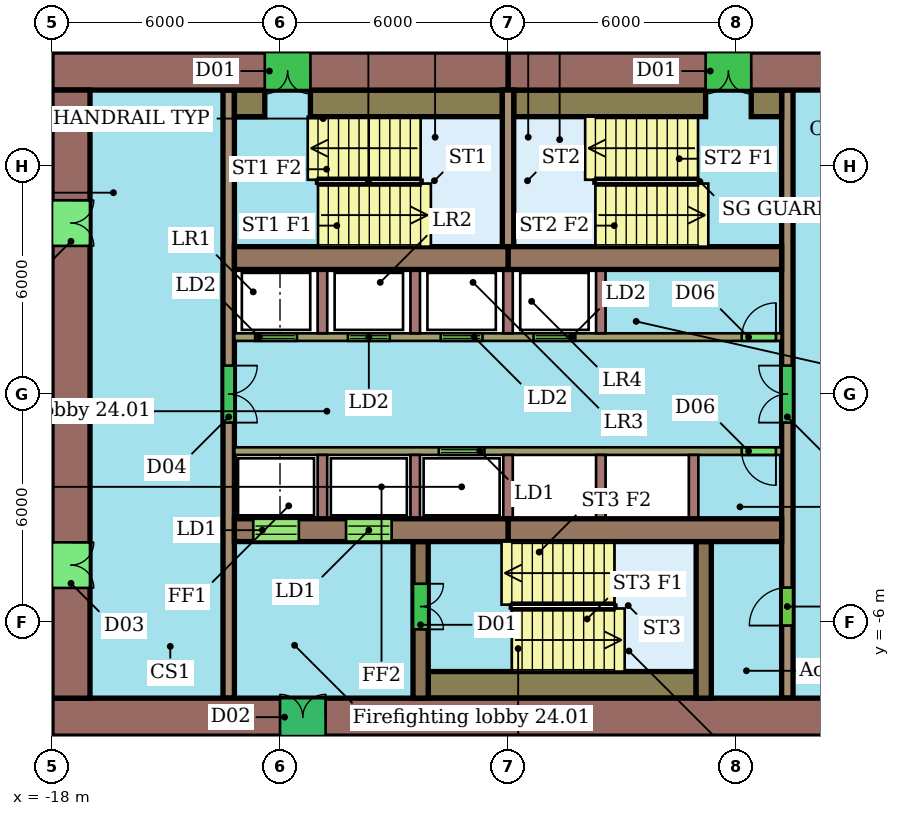
"""IFC4 building model, lengths in metres.
Left out: names, types, materials, properties, quantities, classifications, styles, units other than length and angle.
Written with IfcOpenShell. Run it as: python <this file> out.ifc"""

import sys

from ifc_helpers import new_model, si_unit, direction, frame, frame_2d, origin, place, context, subcontext, project, spatial, rectangle, extrude, element, fill, save


model = new_model("IFC4")
c1 = context("Model", 3, precision=1e-05, world=origin(), true_north=direction((0.0, 1.0)))
c2 = subcontext(c1, "Body", "Model", "MODEL_VIEW")
j1 = project(units=[si_unit("LENGTHUNIT", "METRE"), si_unit("PLANEANGLEUNIT", "RADIAN")], contexts=[c1])
p1 = place(None, origin())
s1 = spatial("IfcSite", under=j1, at=p1, CompositionType="ELEMENT")
p2 = place(p1, origin())
s2 = spatial("IfcBuilding", under=s1, at=p2, CompositionType="ELEMENT")
p3 = place(p2, frame((0.0, 0.0, 106.6)))
s3 = spatial("IfcBuildingStorey", under=s2, at=p3, CompositionType="ELEMENT", Elevation=106.6)
p4 = place(p3, frame((6.0, 8.5, 0.0), z_axis=(0.0, 0.0, 1.0), x_axis=(-1.0, 0.0, 0.0)))
e1 = element("IfcWall", 1, at=p4, inside=s3, PredefinedType="SHEAR", context=c2, shape_type="SweptSolid", body=[
    extrude(rectangle(XDim=12.0, YDim=1.0, at=frame_2d((6.0, 0.0))), origin(), (0.0, 0.0, 1.0), 3.3),
])
p5 = place(p4, frame((5.6, 0.0, 0.0)))
e2 = element("IfcOpeningElement", 2, at=p5, cuts=e1, PredefinedType="OPENING", context=c2, shape_type="SweptSolid", body=[
    extrude(rectangle(XDim=1.2, YDim=2.1, at=frame_2d((0.6, 1.05))), frame((0.0, 0.51, 0.0), z_axis=(0.0, -1.0, 0.0), x_axis=(1.0, 0.0, 0.0)), (0.0, 0.0, 1.0), 1.02),
])
p6 = place(p3, frame((-6.0, 8.5, 0.0), z_axis=(0.0, 0.0, 1.0), x_axis=(-1.0, 0.0, 0.0)))
e3 = element("IfcWall", 3, at=p6, inside=s3, PredefinedType="SHEAR", context=c2, shape_type="SweptSolid", body=[
    extrude(rectangle(XDim=12.0, YDim=1.0, at=frame_2d((6.0, 0.0))), origin(), (0.0, 0.0, 1.0), 3.3),
])
p7 = place(p6, frame((5.2, 0.0, 0.0)))
e4 = element("IfcOpeningElement", 4, at=p7, cuts=e3, PredefinedType="OPENING", context=c2, shape_type="SweptSolid", body=[
    extrude(rectangle(XDim=1.2, YDim=2.1, at=frame_2d((0.6, 1.05))), frame((0.0, 0.51, 0.0), z_axis=(0.0, -1.0, 0.0), x_axis=(1.0, 0.0, 0.0)), (0.0, 0.0, 1.0), 1.02),
])
p8 = place(p3, frame((-18.0, -8.5, 0.0), z_axis=(0.0, 0.0, 1.0), x_axis=(1.0, 0.0, 0.0)))
e5 = element("IfcWall", 5, at=p8, inside=s3, PredefinedType="SHEAR", context=c2, shape_type="SweptSolid", body=[
    extrude(rectangle(XDim=24.0, YDim=1.0, at=frame_2d((12.0, 0.0))), origin(), (0.0, 0.0, 1.0), 3.3),
])
p9 = place(p8, frame((6.0, 0.0, 0.0)))
e6 = element("IfcOpeningElement", 6, at=p9, cuts=e5, PredefinedType="OPENING", context=c2, shape_type="SweptSolid", body=[
    extrude(rectangle(XDim=1.2, YDim=2.1, at=frame_2d((0.6, 1.05))), frame((0.0, 0.51, 0.0), z_axis=(0.0, -1.0, 0.0), x_axis=(1.0, 0.0, 0.0)), (0.0, 0.0, 1.0), 1.02),
])
p10 = place(p3, frame((-17.5, 8.0, 0.0), z_axis=(0.0, 0.0, 1.0), x_axis=(0.0, -1.0, 0.0)))
e7 = element("IfcWall", 7, at=p10, inside=s3, PredefinedType="SHEAR", context=c2, shape_type="SweptSolid", body=[
    extrude(rectangle(XDim=16.0, YDim=1.0, at=frame_2d((8.0, 0.0))), origin(), (0.0, 0.0, 1.0), 3.3),
])
p11 = place(p10, frame((11.9, 0.0, 0.0)))
e8 = element("IfcOpeningElement", 8, at=p11, cuts=e7, PredefinedType="OPENING", context=c2, shape_type="SweptSolid", body=[
    extrude(rectangle(XDim=1.2, YDim=2.1, at=frame_2d((0.6, 1.05))), frame((0.0, 0.51, 0.0), z_axis=(0.0, -1.0, 0.0), x_axis=(1.0, 0.0, 0.0)), (0.0, 0.0, 1.0), 1.02),
])
p12 = place(p10, frame((2.9, 0.0, 0.0)))
e9 = element("IfcOpeningElement", 9, at=p12, cuts=e7, PredefinedType="OPENING", context=c2, shape_type="SweptSolid", body=[
    extrude(rectangle(XDim=1.2, YDim=2.1, at=frame_2d((0.6, 1.05))), frame((0.0, 0.51, 0.0), z_axis=(0.0, -1.0, 0.0), x_axis=(1.0, 0.0, 0.0)), (0.0, 0.0, 1.0), 1.02),
])
for number, where, z_axis, x_axis in (
    (10, (-13.2, 3.58, 0.0), (0.0, 0.0, 1.0), (1.0, 0.0, 0.0)),
    (11, (-6.0, 3.58, 0.0), (0.0, 0.0, 1.0), (1.0, 0.0, 0.0)),
):
    element("IfcWall", number, at=place(p3, frame(where, z_axis=z_axis, x_axis=x_axis)), inside=s3, PredefinedType="SHEAR", context=c2, shape_type="SweptSolid", body=[
        extrude(rectangle(XDim=7.2, YDim=0.6, at=frame_2d((3.6, 0.0))), origin(), (0.0, 0.0, 1.0), 3.3),
    ])
p13 = place(p3, frame((-13.2, -3.58, 0.0), z_axis=(0.0, 0.0, 1.0), x_axis=(1.0, 0.0, 0.0)))
e12 = element("IfcWall", 12, at=p13, inside=s3, PredefinedType="SHEAR", context=c2, shape_type="SweptSolid", body=[
    extrude(rectangle(XDim=7.2, YDim=0.6, at=frame_2d((3.6, 0.0))), origin(), (0.0, 0.0, 1.0), 3.3),
])
p14 = place(p13, frame((0.496, 0.0, 0.0)))
e13 = element("IfcOpeningElement", 13, at=p14, cuts=e12, PredefinedType="OPENING", context=c2, shape_type="SweptSolid", body=[
    extrude(rectangle(XDim=1.2, YDim=2.1, at=frame_2d((0.6, 1.05))), frame((0.0, 0.31, 0.0), z_axis=(0.0, -1.0, 0.0), x_axis=(1.0, 0.0, 0.0)), (0.0, 0.0, 1.0), 0.62),
])
p15 = place(p13, frame((2.938, 0.0, 0.0)))
e14 = element("IfcOpeningElement", 14, at=p15, cuts=e12, PredefinedType="OPENING", context=c2, shape_type="SweptSolid", body=[
    extrude(rectangle(XDim=1.2, YDim=2.1, at=frame_2d((0.6, 1.05))), frame((0.0, 0.31, 0.0), z_axis=(0.0, -1.0, 0.0), x_axis=(1.0, 0.0, 0.0)), (0.0, 0.0, 1.0), 0.62),
])
p16 = place(p3, frame((-6.0, -3.58, 0.0), z_axis=(0.0, 0.0, 1.0), x_axis=(1.0, 0.0, 0.0)))
e15 = element("IfcWall", 15, at=p16, inside=s3, PredefinedType="SHEAR", context=c2, shape_type="SweptSolid", body=[
    extrude(rectangle(XDim=7.2, YDim=0.6, at=frame_2d((3.6, 0.0))), origin(), (0.0, 0.0, 1.0), 3.3),
])
p17 = place(p3, frame((-13.35, 8.0, 0.0), z_axis=(0.0, 0.0, 1.0), x_axis=(0.0, -1.0, 0.0)))
e16 = element("IfcWall", 16, at=p17, inside=s3, PredefinedType="SHEAR", context=c2, shape_type="SweptSolid", body=[
    extrude(rectangle(XDim=16.0, YDim=0.3, at=frame_2d((8.0, 0.0))), origin(), (0.0, 0.0, 1.0), 3.3),
])
p18 = place(p17, frame((7.25, 0.0, 0.0)))
e17 = element("IfcOpeningElement", 17, at=p18, cuts=e16, PredefinedType="OPENING", context=c2, shape_type="SweptSolid", body=[
    extrude(rectangle(XDim=1.5, YDim=2.1, at=frame_2d((0.75, 1.05))), frame((0.0, 0.16, 0.0), z_axis=(0.0, -1.0, 0.0), x_axis=(1.0, 0.0, 0.0)), (0.0, 0.0, 1.0), 0.32),
])
p19 = place(p3, frame((1.35, -8.0, 0.0), z_axis=(0.0, 0.0, 1.0), x_axis=(0.0, 1.0, 0.0)))
e18 = element("IfcWall", 18, at=p19, inside=s3, PredefinedType="SHEAR", context=c2, shape_type="SweptSolid", body=[
    extrude(rectangle(XDim=16.0, YDim=0.3, at=frame_2d((8.0, 0.0))), origin(), (0.0, 0.0, 1.0), 3.3),
])
p20 = place(p19, frame((1.91, 0.0, 0.0)))
e19 = element("IfcOpeningElement", 19, at=p20, cuts=e18, PredefinedType="OPENING", context=c2, shape_type="SweptSolid", body=[
    extrude(rectangle(XDim=1.0, YDim=2.1, at=frame_2d((0.5, 1.05))), frame((0.0, 0.16, 0.0), z_axis=(0.0, -1.0, 0.0), x_axis=(1.0, 0.0, 0.0)), (0.0, 0.0, 1.0), 0.32),
])
p21 = place(p19, frame((7.25, 0.0, 0.0)))
e20 = element("IfcOpeningElement", 20, at=p21, cuts=e18, PredefinedType="OPENING", context=c2, shape_type="SweptSolid", body=[
    extrude(rectangle(XDim=1.5, YDim=2.1, at=frame_2d((0.75, 1.05))), frame((0.0, 0.16, 0.0), z_axis=(0.0, -1.0, 0.0), x_axis=(1.0, 0.0, 0.0)), (0.0, 0.0, 1.0), 0.32),
])
p22 = place(p3, frame((-13.2, 1.5, 0.0), z_axis=(0.0, 0.0, 1.0), x_axis=(1.0, 0.0, 0.0)))
e21 = element("IfcWall", 21, at=p22, inside=s3, PredefinedType="SHEAR", context=c2, shape_type="SweptSolid", body=[
    extrude(rectangle(XDim=14.4, YDim=0.2, at=frame_2d((7.2, 0.0))), origin(), (0.0, 0.0, 1.0), 3.3),
])
p23 = place(p22, frame((0.546, 0.0, 0.0)))
e22 = element("IfcOpeningElement", 22, at=p23, cuts=e21, PredefinedType="OPENING", context=c2, shape_type="SweptSolid", body=[
    extrude(rectangle(XDim=1.1, YDim=2.1, at=frame_2d((0.55, 1.05))), frame((0.0, 0.11, 0.0), z_axis=(0.0, -1.0, 0.0), x_axis=(1.0, 0.0, 0.0)), (0.0, 0.0, 1.0), 0.22),
])
p24 = place(p22, frame((2.988, 0.0, 0.0)))
e23 = element("IfcOpeningElement", 23, at=p24, cuts=e21, PredefinedType="OPENING", context=c2, shape_type="SweptSolid", body=[
    extrude(rectangle(XDim=1.1, YDim=2.1, at=frame_2d((0.55, 1.05))), frame((0.0, 0.11, 0.0), z_axis=(0.0, -1.0, 0.0), x_axis=(1.0, 0.0, 0.0)), (0.0, 0.0, 1.0), 0.22),
])
p25 = place(p22, frame((5.429, 0.0, 0.0)))
e24 = element("IfcOpeningElement", 24, at=p25, cuts=e21, PredefinedType="OPENING", context=c2, shape_type="SweptSolid", body=[
    extrude(rectangle(XDim=1.1, YDim=2.1, at=frame_2d((0.55, 1.05))), frame((0.0, 0.11, 0.0), z_axis=(0.0, -1.0, 0.0), x_axis=(1.0, 0.0, 0.0)), (0.0, 0.0, 1.0), 0.22),
])
p26 = place(p22, frame((7.871, 0.0, 0.0)))
e25 = element("IfcOpeningElement", 25, at=p26, cuts=e21, PredefinedType="OPENING", context=c2, shape_type="SweptSolid", body=[
    extrude(rectangle(XDim=1.1, YDim=2.1, at=frame_2d((0.55, 1.05))), frame((0.0, 0.11, 0.0), z_axis=(0.0, -1.0, 0.0), x_axis=(1.0, 0.0, 0.0)), (0.0, 0.0, 1.0), 0.22),
])
p27 = place(p22, frame((13.35, 0.0, 0.0)))
e26 = element("IfcOpeningElement", 26, at=p27, cuts=e21, PredefinedType="OPENING", context=c2, shape_type="SweptSolid", body=[
    extrude(rectangle(XDim=0.9, YDim=2.1, at=frame_2d((0.45, 1.05))), frame((0.0, 0.11, 0.0), z_axis=(0.0, -1.0, 0.0), x_axis=(1.0, 0.0, 0.0)), (0.0, 0.0, 1.0), 0.22),
])
p28 = place(p3, frame((1.2, -1.5, 0.0), z_axis=(0.0, 0.0, 1.0), x_axis=(-1.0, 0.0, 0.0)))
e27 = element("IfcWall", 27, at=p28, inside=s3, PredefinedType="SHEAR", context=c2, shape_type="SweptSolid", body=[
    extrude(rectangle(XDim=14.4, YDim=0.2, at=frame_2d((7.2, 0.0))), origin(), (0.0, 0.0, 1.0), 3.3),
])
p29 = place(p28, frame((7.821, 0.0, 0.0)))
e28 = element("IfcOpeningElement", 28, at=p29, cuts=e27, PredefinedType="OPENING", context=c2, shape_type="SweptSolid", body=[
    extrude(rectangle(XDim=1.2, YDim=2.1, at=frame_2d((0.6, 1.05))), frame((0.0, 0.11, 0.0), z_axis=(0.0, -1.0, 0.0), x_axis=(1.0, 0.0, 0.0)), (0.0, 0.0, 1.0), 0.22),
])
p30 = place(p28, frame((0.15, 0.0, 0.0)))
e29 = element("IfcOpeningElement", 29, at=p30, cuts=e27, PredefinedType="OPENING", context=c2, shape_type="SweptSolid", body=[
    extrude(rectangle(XDim=0.9, YDim=2.1, at=frame_2d((0.45, 1.05))), frame((0.0, 0.11, 0.0), z_axis=(0.0, -1.0, 0.0), x_axis=(1.0, 0.0, 0.0)), (0.0, 0.0, 1.0), 0.22),
])
p31 = place(p3, frame((-8.3, -3.88, 0.0), z_axis=(0.0, 0.0, 1.0), x_axis=(0.0, -1.0, 0.0)))
e30 = element("IfcWall", 30, at=p31, inside=s3, PredefinedType="SHEAR", context=c2, shape_type="SweptSolid", body=[
    extrude(rectangle(XDim=4.12, YDim=0.4, at=frame_2d((2.06, 0.0))), origin(), (0.0, 0.0, 1.0), 3.3),
])
p32 = place(p31, frame((1.11, 0.0, 0.0)))
e31 = element("IfcOpeningElement", 31, at=p32, cuts=e30, PredefinedType="OPENING", context=c2, shape_type="SweptSolid", body=[
    extrude(rectangle(XDim=1.2, YDim=2.1, at=frame_2d((0.6, 1.05))), frame((0.0, 0.21, 0.0), z_axis=(0.0, -1.0, 0.0), x_axis=(1.0, 0.0, 0.0)), (0.0, 0.0, 1.0), 0.42),
])
p33 = place(p3, frame((-0.85, -3.88, 0.0), z_axis=(0.0, 0.0, 1.0), x_axis=(0.0, -1.0, 0.0)))
e32 = element("IfcWall", 32, at=p33, inside=s3, PredefinedType="SHEAR", context=c2, shape_type="SweptSolid", body=[
    extrude(rectangle(XDim=4.12, YDim=0.4, at=frame_2d((2.06, 0.0))), origin(), (0.0, 0.0, 1.0), 3.3),
])
p34 = place(p3, frame((-6.0, 3.88, 0.0), z_axis=(0.0, 0.0, 1.0), x_axis=(0.0, 1.0, 0.0)))
e33 = element("IfcWall", 33, at=p34, inside=s3, PredefinedType="SHEAR", context=c2, shape_type="SweptSolid", body=[
    extrude(rectangle(XDim=4.12, YDim=0.3, at=frame_2d((2.06, 0.0))), origin(), (0.0, 0.0, 1.0), 3.3),
])
p35 = place(p3, frame((-13.2, 7.65, 0.0), z_axis=(0.0, 0.0, 1.0), x_axis=(1.0, 0.0, 0.0)))
e34 = element("IfcWall", 34, at=p35, inside=s3, PredefinedType="SHEAR", context=c2, shape_type="SweptSolid", body=[
    extrude(rectangle(XDim=0.8, YDim=0.7, at=frame_2d((0.4, 0.0))), origin(), (0.0, 0.0, 1.0), 3.3),
])
for number, where, z_axis, x_axis in (
    (35, (-11.2, 7.65, 0.0), (0.0, 0.0, 1.0), (1.0, 0.0, 0.0)),
    (36, (-5.85, 7.65, 0.0), (0.0, 0.0, 1.0), (1.0, 0.0, 0.0)),
):
    element("IfcWall", number, at=place(p3, frame(where, z_axis=z_axis, x_axis=x_axis)), inside=s3, PredefinedType="SHEAR", context=c2, shape_type="SweptSolid", body=[
        extrude(rectangle(XDim=5.05, YDim=0.7, at=frame_2d((2.525, 0.0))), origin(), (0.0, 0.0, 1.0), 3.3),
    ])
p36 = place(p3, frame((0.4, 7.65, 0.0), z_axis=(0.0, 0.0, 1.0), x_axis=(1.0, 0.0, 0.0)))
e37 = element("IfcWall", 37, at=p36, inside=s3, PredefinedType="SHEAR", context=c2, shape_type="SweptSolid", body=[
    extrude(rectangle(XDim=0.8, YDim=0.7, at=frame_2d((0.4, 0.0))), origin(), (0.0, 0.0, 1.0), 3.3),
])
p37 = place(p3, frame((-8.1, -7.65, 0.0), z_axis=(0.0, 0.0, 1.0), x_axis=(1.0, 0.0, 0.0)))
e38 = element("IfcWall", 38, at=p37, inside=s3, PredefinedType="SHEAR", context=c2, shape_type="SweptSolid", body=[
    extrude(rectangle(XDim=7.05, YDim=0.7, at=frame_2d((3.525, 0.0))), origin(), (0.0, 0.0, 1.0), 3.3),
])
for number, where, z_axis, x_axis in (
    (39, (-10.883, 1.6, 0.0), (0.0, 0.0, 1.0), (0.0, 1.0, 0.0)),
    (40, (-8.442, 1.6, 0.0), (0.0, 0.0, 1.0), (0.0, 1.0, 0.0)),
    (41, (-6.0, 1.6, 0.0), (0.0, 0.0, 1.0), (0.0, 1.0, 0.0)),
    (42, (-3.558, 1.6, 0.0), (0.0, 0.0, 1.0), (0.0, 1.0, 0.0)),
    (43, (-10.883, -1.6, 0.0), (0.0, 0.0, 1.0), (0.0, -1.0, 0.0)),
    (44, (-8.442, -1.6, 0.0), (0.0, 0.0, 1.0), (0.0, -1.0, 0.0)),
    (45, (-6.0, -1.6, 0.0), (0.0, 0.0, 1.0), (0.0, -1.0, 0.0)),
    (46, (-3.558, -1.6, 0.0), (0.0, 0.0, 1.0), (0.0, -1.0, 0.0)),
    (47, (-1.117, -1.6, 0.0), (0.0, 0.0, 1.0), (0.0, -1.0, 0.0)),
):
    element("IfcWall", number, at=place(p3, frame(where, z_axis=z_axis, x_axis=x_axis)), inside=s3, PredefinedType="SHEAR", context=c2, shape_type="SweptSolid", body=[
        extrude(rectangle(XDim=1.68, YDim=0.25, at=frame_2d((0.84, 0.0))), origin(), (0.0, 0.0, 1.0), 3.3),
    ])
p38 = place(p5, origin())
e48 = element("IfcDoor", 48, at=p38, inside=s3, OperationType="DOUBLE_DOOR_SINGLE_SWING", PredefinedType="NOTDEFINED", context=c2, shape_type="SweptSolid", body=[
    extrude(rectangle(XDim=1.2, YDim=2.1, at=frame_2d((0.6, 1.05))), frame((0.0, 0.025, 0.0), z_axis=(0.0, -1.0, 0.0), x_axis=(1.0, 0.0, 0.0)), (0.0, 0.0, 1.0), 0.05),
])
fill(e2, e48)
p39 = place(p7, origin())
e49 = element("IfcDoor", 49, at=p39, inside=s3, OperationType="DOUBLE_DOOR_SINGLE_SWING", PredefinedType="NOTDEFINED", context=c2, shape_type="SweptSolid", body=[
    extrude(rectangle(XDim=1.2, YDim=2.1, at=frame_2d((0.6, 1.05))), frame((0.0, 0.025, 0.0), z_axis=(0.0, -1.0, 0.0), x_axis=(1.0, 0.0, 0.0)), (0.0, 0.0, 1.0), 0.05),
])
fill(e4, e49)
p40 = place(p9, origin())
e50 = element("IfcDoor", 50, at=p40, inside=s3, OperationType="DOUBLE_DOOR_SINGLE_SWING", PredefinedType="NOTDEFINED", context=c2, shape_type="SweptSolid", body=[
    extrude(rectangle(XDim=1.2, YDim=2.1, at=frame_2d((0.6, 1.05))), frame((0.0, 0.025, 0.0), z_axis=(0.0, -1.0, 0.0), x_axis=(1.0, 0.0, 0.0)), (0.0, 0.0, 1.0), 0.05),
])
fill(e6, e50)
p41 = place(p11, origin())
e51 = element("IfcDoor", 51, at=p41, inside=s3, OperationType="DOUBLE_DOOR_SINGLE_SWING", PredefinedType="NOTDEFINED", context=c2, shape_type="SweptSolid", body=[
    extrude(rectangle(XDim=1.2, YDim=2.1, at=frame_2d((0.6, 1.05))), frame((0.0, 0.025, 0.0), z_axis=(0.0, -1.0, 0.0), x_axis=(1.0, 0.0, 0.0)), (0.0, 0.0, 1.0), 0.05),
])
fill(e8, e51)
p42 = place(p12, origin())
e52 = element("IfcDoor", 52, at=p42, inside=s3, OperationType="DOUBLE_DOOR_SINGLE_SWING", PredefinedType="NOTDEFINED", context=c2, shape_type="SweptSolid", body=[
    extrude(rectangle(XDim=1.2, YDim=2.1, at=frame_2d((0.6, 1.05))), frame((0.0, 0.025, 0.0), z_axis=(0.0, -1.0, 0.0), x_axis=(1.0, 0.0, 0.0)), (0.0, 0.0, 1.0), 0.05),
])
fill(e9, e52)
p43 = place(p14, origin())
e53 = element("IfcDoor", 53, at=p43, inside=s3, OperationType="DOUBLE_DOOR_SLIDING", PredefinedType="NOTDEFINED", context=c2, shape_type="SweptSolid", body=[
    extrude(rectangle(XDim=1.2, YDim=2.1, at=frame_2d((0.6, 1.05))), frame((0.0, 0.025, 0.0), z_axis=(0.0, -1.0, 0.0), x_axis=(1.0, 0.0, 0.0)), (0.0, 0.0, 1.0), 0.05),
])
fill(e13, e53)
p44 = place(p15, origin())
e54 = element("IfcDoor", 54, at=p44, inside=s3, OperationType="DOUBLE_DOOR_SLIDING", PredefinedType="NOTDEFINED", context=c2, shape_type="SweptSolid", body=[
    extrude(rectangle(XDim=1.2, YDim=2.1, at=frame_2d((0.6, 1.05))), frame((0.0, 0.025, 0.0), z_axis=(0.0, -1.0, 0.0), x_axis=(1.0, 0.0, 0.0)), (0.0, 0.0, 1.0), 0.05),
])
fill(e14, e54)
p45 = place(p18, origin())
e55 = element("IfcDoor", 55, at=p45, inside=s3, OperationType="DOUBLE_DOOR_SINGLE_SWING", PredefinedType="NOTDEFINED", context=c2, shape_type="SweptSolid", body=[
    extrude(rectangle(XDim=1.5, YDim=2.1, at=frame_2d((0.75, 1.05))), frame((0.0, 0.025, 0.0), z_axis=(0.0, -1.0, 0.0), x_axis=(1.0, 0.0, 0.0)), (0.0, 0.0, 1.0), 0.05),
])
fill(e17, e55)
p46 = place(p20, origin())
e56 = element("IfcDoor", 56, at=p46, inside=s3, OperationType="SINGLE_SWING_LEFT", PredefinedType="NOTDEFINED", context=c2, shape_type="SweptSolid", body=[
    extrude(rectangle(XDim=1.0, YDim=2.1, at=frame_2d((0.5, 1.05))), frame((0.0, 0.025, 0.0), z_axis=(0.0, -1.0, 0.0), x_axis=(1.0, 0.0, 0.0)), (0.0, 0.0, 1.0), 0.05),
])
fill(e19, e56)
p47 = place(p21, origin())
e57 = element("IfcDoor", 57, at=p47, inside=s3, OperationType="DOUBLE_DOOR_SINGLE_SWING", PredefinedType="NOTDEFINED", context=c2, shape_type="SweptSolid", body=[
    extrude(rectangle(XDim=1.5, YDim=2.1, at=frame_2d((0.75, 1.05))), frame((0.0, 0.025, 0.0), z_axis=(0.0, -1.0, 0.0), x_axis=(1.0, 0.0, 0.0)), (0.0, 0.0, 1.0), 0.05),
])
fill(e20, e57)
p48 = place(p23, origin())
e58 = element("IfcDoor", 58, at=p48, inside=s3, OperationType="DOUBLE_DOOR_SLIDING", PredefinedType="NOTDEFINED", context=c2, shape_type="SweptSolid", body=[
    extrude(rectangle(XDim=1.1, YDim=2.1, at=frame_2d((0.55, 1.05))), frame((0.0, 0.025, 0.0), z_axis=(0.0, -1.0, 0.0), x_axis=(1.0, 0.0, 0.0)), (0.0, 0.0, 1.0), 0.05),
])
fill(e22, e58)
p49 = place(p24, origin())
e59 = element("IfcDoor", 59, at=p49, inside=s3, OperationType="DOUBLE_DOOR_SLIDING", PredefinedType="NOTDEFINED", context=c2, shape_type="SweptSolid", body=[
    extrude(rectangle(XDim=1.1, YDim=2.1, at=frame_2d((0.55, 1.05))), frame((0.0, 0.025, 0.0), z_axis=(0.0, -1.0, 0.0), x_axis=(1.0, 0.0, 0.0)), (0.0, 0.0, 1.0), 0.05),
])
fill(e23, e59)
p50 = place(p25, origin())
e60 = element("IfcDoor", 60, at=p50, inside=s3, OperationType="DOUBLE_DOOR_SLIDING", PredefinedType="NOTDEFINED", context=c2, shape_type="SweptSolid", body=[
    extrude(rectangle(XDim=1.1, YDim=2.1, at=frame_2d((0.55, 1.05))), frame((0.0, 0.025, 0.0), z_axis=(0.0, -1.0, 0.0), x_axis=(1.0, 0.0, 0.0)), (0.0, 0.0, 1.0), 0.05),
])
fill(e24, e60)
p51 = place(p26, origin())
e61 = element("IfcDoor", 61, at=p51, inside=s3, OperationType="DOUBLE_DOOR_SLIDING", PredefinedType="NOTDEFINED", context=c2, shape_type="SweptSolid", body=[
    extrude(rectangle(XDim=1.1, YDim=2.1, at=frame_2d((0.55, 1.05))), frame((0.0, 0.025, 0.0), z_axis=(0.0, -1.0, 0.0), x_axis=(1.0, 0.0, 0.0)), (0.0, 0.0, 1.0), 0.05),
])
fill(e25, e61)
p52 = place(p27, origin())
e62 = element("IfcDoor", 62, at=p52, inside=s3, OperationType="SINGLE_SWING_RIGHT", PredefinedType="NOTDEFINED", context=c2, shape_type="SweptSolid", body=[
    extrude(rectangle(XDim=0.9, YDim=2.1, at=frame_2d((0.45, 1.05))), frame((0.0, 0.025, 0.0), z_axis=(0.0, -1.0, 0.0), x_axis=(1.0, 0.0, 0.0)), (0.0, 0.0, 1.0), 0.05),
])
fill(e26, e62)
p53 = place(p29, origin())
e63 = element("IfcDoor", 63, at=p53, inside=s3, OperationType="DOUBLE_DOOR_SLIDING", PredefinedType="NOTDEFINED", context=c2, shape_type="SweptSolid", body=[
    extrude(rectangle(XDim=1.2, YDim=2.1, at=frame_2d((0.6, 1.05))), frame((0.0, 0.025, 0.0), z_axis=(0.0, -1.0, 0.0), x_axis=(1.0, 0.0, 0.0)), (0.0, 0.0, 1.0), 0.05),
])
fill(e28, e63)
p54 = place(p30, origin())
e64 = element("IfcDoor", 64, at=p54, inside=s3, OperationType="SINGLE_SWING_LEFT", PredefinedType="NOTDEFINED", context=c2, shape_type="SweptSolid", body=[
    extrude(rectangle(XDim=0.9, YDim=2.1, at=frame_2d((0.45, 1.05))), frame((0.0, 0.025, 0.0), z_axis=(0.0, -1.0, 0.0), x_axis=(1.0, 0.0, 0.0)), (0.0, 0.0, 1.0), 0.05),
])
fill(e29, e64)
p55 = place(p32, origin())
e65 = element("IfcDoor", 65, at=p55, inside=s3, OperationType="DOUBLE_DOOR_SINGLE_SWING", PredefinedType="NOTDEFINED", context=c2, shape_type="SweptSolid", body=[
    extrude(rectangle(XDim=1.2, YDim=2.1, at=frame_2d((0.6, 1.05))), frame((0.0, 0.025, 0.0), z_axis=(0.0, -1.0, 0.0), x_axis=(1.0, 0.0, 0.0)), (0.0, 0.0, 1.0), 0.05),
])
fill(e31, e65)
save(model, sys.argv[1])
